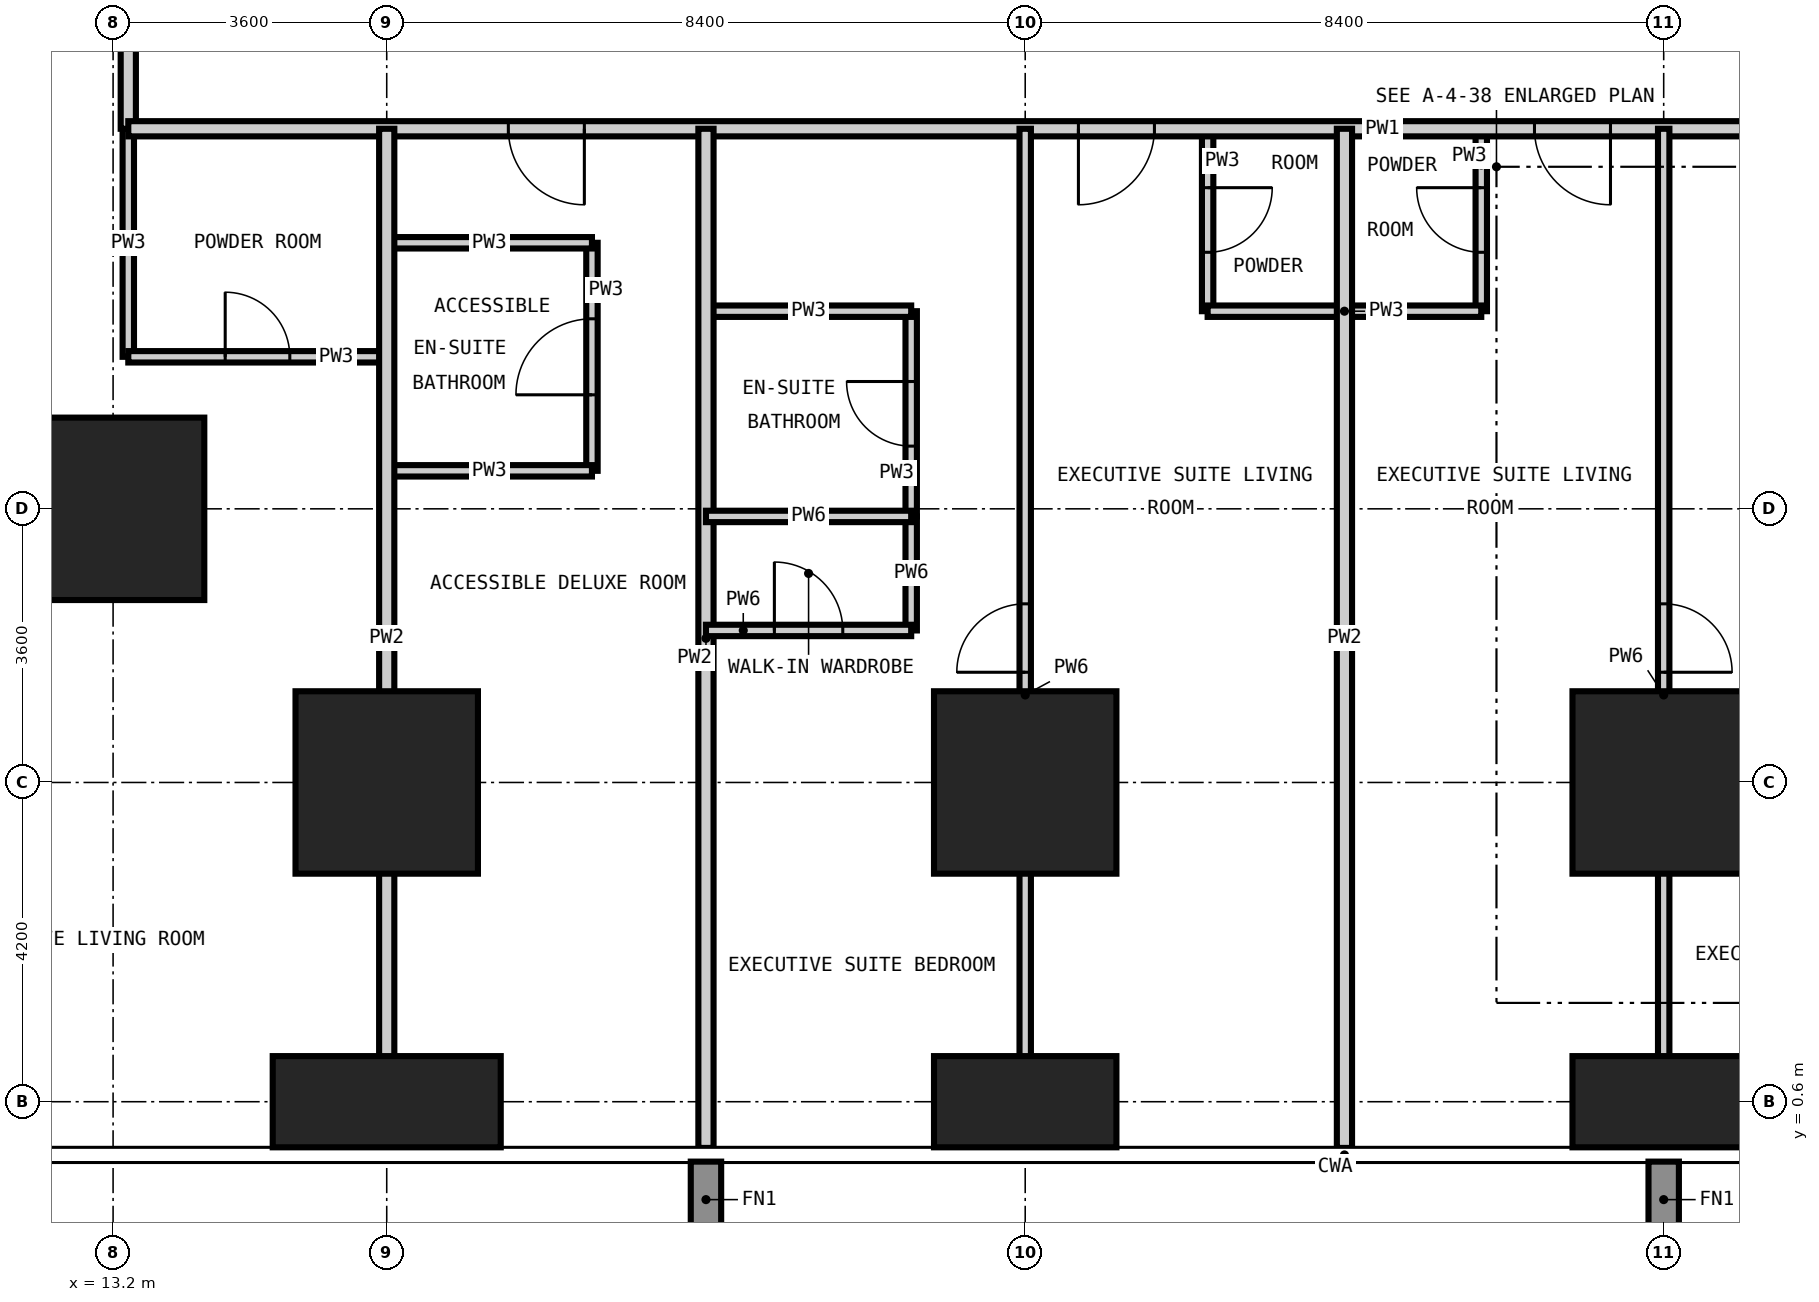
"""IFC4 building model, lengths in metres.
Left out: names, types, materials, properties, quantities, classifications, styles, units other than length and angle.
Written with IfcOpenShell. Run it as: python <this file> out.ifc"""

import sys

from ifc_helpers import new_model, si_unit, direction, frame, frame_2d, origin, origin_2d, place, context, subcontext, project, spatial, rectangle, extrude, element, fill, save


model = new_model("IFC4")
c1 = context("Model", 3, precision=1e-05, world=origin(), true_north=direction((0.0, 1.0)))
c2 = subcontext(c1, "Body", "Model", "MODEL_VIEW")
j1 = project(units=[si_unit("LENGTHUNIT", "METRE"), si_unit("PLANEANGLEUNIT", "RADIAN")], contexts=[c1])
p1 = place(None, origin())
s1 = spatial("IfcSite", under=j1, at=p1, CompositionType="ELEMENT")
p2 = place(p1, origin())
s2 = spatial("IfcBuilding", under=s1, at=p2, CompositionType="ELEMENT")
p3 = place(p2, frame((0.0, 0.0, 84.6)))
s3 = spatial("IfcBuildingStorey", under=s2, at=p3, CompositionType="ELEMENT", Elevation=84.6)
p4 = place(p3, frame((13.2, 8.4, -0.35), z_axis=(0.0, 0.0, 1.0), x_axis=(1.0, 0.0, 0.0)))
e1 = element("IfcColumn", 1, at=p4, inside=s3, PredefinedType="COLUMN", context=c2, shape_type="SweptSolid", body=[
    extrude(rectangle(XDim=2.4, YDim=2.4, at=origin_2d()), origin(), (0.0, 0.0, 1.0), 3.55),
])
p5 = place(p3, frame((16.8, 0.6, -0.35), z_axis=(0.0, 0.0, 1.0), x_axis=(1.0, 0.0, 0.0)))
e2 = element("IfcColumn", 2, at=p5, inside=s3, PredefinedType="COLUMN", context=c2, shape_type="SweptSolid", body=[
    extrude(rectangle(XDim=3.0, YDim=1.2, at=origin_2d()), origin(), (0.0, 0.0, 1.0), 3.55),
])
p6 = place(p3, frame((16.8, 4.8, -0.35), z_axis=(0.0, 0.0, 1.0), x_axis=(1.0, 0.0, 0.0)))
e3 = element("IfcColumn", 3, at=p6, inside=s3, PredefinedType="COLUMN", context=c2, shape_type="SweptSolid", body=[
    extrude(rectangle(XDim=2.4, YDim=2.4, at=origin_2d()), origin(), (0.0, 0.0, 1.0), 3.55),
])
p7 = place(p3, frame((25.2, 0.6, -0.35), z_axis=(0.0, 0.0, 1.0), x_axis=(1.0, 0.0, 0.0)))
e4 = element("IfcColumn", 4, at=p7, inside=s3, PredefinedType="COLUMN", context=c2, shape_type="SweptSolid", body=[
    extrude(rectangle(XDim=2.4, YDim=1.2, at=origin_2d()), origin(), (0.0, 0.0, 1.0), 3.55),
])
p8 = place(p3, frame((25.2, 4.8, -0.35), z_axis=(0.0, 0.0, 1.0), x_axis=(1.0, 0.0, 0.0)))
e5 = element("IfcColumn", 5, at=p8, inside=s3, PredefinedType="COLUMN", context=c2, shape_type="SweptSolid", body=[
    extrude(rectangle(XDim=2.4, YDim=2.4, at=origin_2d()), origin(), (0.0, 0.0, 1.0), 3.55),
])
p9 = place(p3, frame((33.6, 0.6, -0.35), z_axis=(0.0, 0.0, 1.0), x_axis=(1.0, 0.0, 0.0)))
e6 = element("IfcColumn", 6, at=p9, inside=s3, PredefinedType="COLUMN", context=c2, shape_type="SweptSolid", body=[
    extrude(rectangle(XDim=2.4, YDim=1.2, at=origin_2d()), origin(), (0.0, 0.0, 1.0), 3.55),
])
p10 = place(p3, frame((33.6, 4.8, -0.35), z_axis=(0.0, 0.0, 1.0), x_axis=(1.0, 0.0, 0.0)))
e7 = element("IfcColumn", 7, at=p10, inside=s3, PredefinedType="COLUMN", context=c2, shape_type="SweptSolid", body=[
    extrude(rectangle(XDim=2.4, YDim=2.4, at=origin_2d()), origin(), (0.0, 0.0, 1.0), 3.55),
])
p11 = place(p3, frame((13.4, 10.4, 0.0), z_axis=(0.0, 0.0, 1.0), x_axis=(0.0, 1.0, 0.0)))
e8 = element("IfcWall", 8, at=p11, inside=s3, PredefinedType="PARTITIONING", context=c2, shape_type="SweptSolid", body=[
    extrude(rectangle(XDim=3.0, YDim=0.15, at=frame_2d((1.5, 0.0))), origin(), (0.0, 0.0, 1.0), 3.2),
])
p12 = place(p3, frame((19.5, 8.9, 0.0), z_axis=(0.0, 0.0, 1.0), x_axis=(0.0, 1.0, 0.0)))
e9 = element("IfcWall", 9, at=p12, inside=s3, PredefinedType="PARTITIONING", context=c2, shape_type="SweptSolid", body=[
    extrude(rectangle(XDim=3.0, YDim=0.15, at=frame_2d((1.5, 0.0))), origin(), (0.0, 0.0, 1.0), 3.2),
])
p13 = place(p12, frame((1.0, 0.0, 0.0)))
e10 = element("IfcOpeningElement", 10, at=p13, cuts=e9, PredefinedType="OPENING", context=c2, shape_type="SweptSolid", body=[
    extrude(rectangle(XDim=1.0, YDim=2.1, at=frame_2d((0.5, 1.05))), frame((0.0, 0.085, 0.0), z_axis=(0.0, -1.0, 0.0), x_axis=(1.0, 0.0, 0.0)), (0.0, 0.0, 1.0), 0.17),
])
p14 = place(p3, frame((23.7, 8.3, 0.0), z_axis=(0.0, 0.0, 1.0), x_axis=(0.0, 1.0, 0.0)))
e11 = element("IfcWall", 11, at=p14, inside=s3, PredefinedType="PARTITIONING", context=c2, shape_type="SweptSolid", body=[
    extrude(rectangle(XDim=2.7, YDim=0.15, at=frame_2d((1.35, 0.0))), origin(), (0.0, 0.0, 1.0), 3.2),
])
p15 = place(p14, frame((0.925, 0.0, 0.0)))
e12 = element("IfcOpeningElement", 12, at=p15, cuts=e11, PredefinedType="OPENING", context=c2, shape_type="SweptSolid", body=[
    extrude(rectangle(XDim=0.85, YDim=2.1, at=frame_2d((0.425, 1.05))), frame((0.0, 0.085, 0.0), z_axis=(0.0, -1.0, 0.0), x_axis=(1.0, 0.0, 0.0)), (0.0, 0.0, 1.0), 0.17),
])
p16 = place(p3, frame((27.6, 11.0, 0.0), z_axis=(0.0, 0.0, 1.0), x_axis=(0.0, 1.0, 0.0)))
e13 = element("IfcWall", 13, at=p16, inside=s3, PredefinedType="PARTITIONING", context=c2, shape_type="SweptSolid", body=[
    extrude(rectangle(XDim=2.4, YDim=0.15, at=frame_2d((1.2, 0.0))), origin(), (0.0, 0.0, 1.0), 3.2),
])
p17 = place(p16, frame((0.775, 0.0, 0.0)))
e14 = element("IfcOpeningElement", 14, at=p17, cuts=e13, PredefinedType="OPENING", context=c2, shape_type="SweptSolid", body=[
    extrude(rectangle(XDim=0.85, YDim=2.1, at=frame_2d((0.425, 1.05))), frame((0.0, 0.085, 0.0), z_axis=(0.0, -1.0, 0.0), x_axis=(1.0, 0.0, 0.0)), (0.0, 0.0, 1.0), 0.17),
])
p18 = place(p3, frame((31.2, 11.0, 0.0), z_axis=(0.0, 0.0, 1.0), x_axis=(0.0, 1.0, 0.0)))
e15 = element("IfcWall", 15, at=p18, inside=s3, PredefinedType="PARTITIONING", context=c2, shape_type="SweptSolid", body=[
    extrude(rectangle(XDim=2.4, YDim=0.15, at=frame_2d((1.2, 0.0))), origin(), (0.0, 0.0, 1.0), 3.2),
])
p19 = place(p18, frame((0.775, 0.0, 0.0)))
e16 = element("IfcOpeningElement", 16, at=p19, cuts=e15, PredefinedType="OPENING", context=c2, shape_type="SweptSolid", body=[
    extrude(rectangle(XDim=0.85, YDim=2.1, at=frame_2d((0.425, 1.05))), frame((0.0, 0.085, 0.0), z_axis=(0.0, -1.0, 0.0), x_axis=(1.0, 0.0, 0.0)), (0.0, 0.0, 1.0), 0.17),
])
p20 = place(p3, frame((16.8, 8.9, 0.0), z_axis=(0.0, 0.0, 1.0), x_axis=(1.0, 0.0, 0.0)))
e17 = element("IfcWall", 17, at=p20, inside=s3, PredefinedType="PARTITIONING", context=c2, shape_type="SweptSolid", body=[
    extrude(rectangle(XDim=2.7, YDim=0.15, at=frame_2d((1.35, 0.0))), origin(), (0.0, 0.0, 1.0), 3.2),
])
p21 = place(p3, frame((13.4, 10.4, 0.0), z_axis=(0.0, 0.0, 1.0), x_axis=(1.0, 0.0, 0.0)))
e18 = element("IfcWall", 18, at=p21, inside=s3, PredefinedType="PARTITIONING", context=c2, shape_type="SweptSolid", body=[
    extrude(rectangle(XDim=3.4, YDim=0.15, at=frame_2d((1.7, 0.0))), origin(), (0.0, 0.0, 1.0), 3.2),
])
p22 = place(p21, frame((1.275, 0.0, 0.0)))
e19 = element("IfcOpeningElement", 19, at=p22, cuts=e18, PredefinedType="OPENING", context=c2, shape_type="SweptSolid", body=[
    extrude(rectangle(XDim=0.85, YDim=2.1, at=frame_2d((0.425, 1.05))), frame((0.0, 0.085, 0.0), z_axis=(0.0, -1.0, 0.0), x_axis=(1.0, 0.0, 0.0)), (0.0, 0.0, 1.0), 0.17),
])
p23 = place(p3, frame((21.0, 11.0, 0.0), z_axis=(0.0, 0.0, 1.0), x_axis=(1.0, 0.0, 0.0)))
e20 = element("IfcWall", 20, at=p23, inside=s3, PredefinedType="PARTITIONING", context=c2, shape_type="SweptSolid", body=[
    extrude(rectangle(XDim=2.7, YDim=0.15, at=frame_2d((1.35, 0.0))), origin(), (0.0, 0.0, 1.0), 3.2),
])
p24 = place(p3, frame((27.6, 11.0, 0.0), z_axis=(0.0, 0.0, 1.0), x_axis=(1.0, 0.0, 0.0)))
e21 = element("IfcWall", 21, at=p24, inside=s3, PredefinedType="PARTITIONING", context=c2, shape_type="SweptSolid", body=[
    extrude(rectangle(XDim=3.6, YDim=0.15, at=frame_2d((1.8, 0.0))), origin(), (0.0, 0.0, 1.0), 3.2),
])
p25 = place(p3, frame((16.8, 11.9, 0.0), z_axis=(0.0, 0.0, 1.0), x_axis=(1.0, 0.0, 0.0)))
e22 = element("IfcWall", 22, at=p25, inside=s3, PredefinedType="PARTITIONING", context=c2, shape_type="SweptSolid", body=[
    extrude(rectangle(XDim=2.7, YDim=0.15, at=frame_2d((1.35, 0.0))), origin(), (0.0, 0.0, 1.0), 3.2),
])
p26 = place(p3, frame((13.4, 13.4, 0.0), z_axis=(0.0, 0.0, 1.0), x_axis=(0.0, 1.0, 0.0)))
e23 = element("IfcWall", 23, at=p26, inside=s3, PredefinedType="PARTITIONING", context=c2, shape_type="SweptSolid", body=[
    extrude(rectangle(XDim=22.6, YDim=0.2, at=frame_2d((11.3, 0.0))), origin(), (0.0, 0.0, 1.0), 3.2),
])
p27 = place(p26, frame((6.35, 0.0, 0.0)))
e24 = element("IfcOpeningElement", 24, at=p27, cuts=e23, PredefinedType="OPENING", context=c2, shape_type="SweptSolid", body=[
    extrude(rectangle(XDim=1.0, YDim=2.2, at=frame_2d((0.5, 1.1))), frame((0.0, 0.11, 0.0), z_axis=(0.0, -1.0, 0.0), x_axis=(1.0, 0.0, 0.0)), (0.0, 0.0, 1.0), 0.22),
])
p28 = place(p26, frame((13.1, 0.0, 0.0)))
e25 = element("IfcOpeningElement", 25, at=p28, cuts=e23, PredefinedType="OPENING", context=c2, shape_type="SweptSolid", body=[
    extrude(rectangle(XDim=1.0, YDim=2.2, at=frame_2d((0.5, 1.1))), frame((0.0, 0.11, 0.0), z_axis=(0.0, -1.0, 0.0), x_axis=(1.0, 0.0, 0.0)), (0.0, 0.0, 1.0), 0.22),
])
p29 = place(p26, frame((16.25, 0.0, 0.0)))
e26 = element("IfcOpeningElement", 26, at=p29, cuts=e23, PredefinedType="OPENING", context=c2, shape_type="SweptSolid", body=[
    extrude(rectangle(XDim=1.0, YDim=2.2, at=frame_2d((0.5, 1.1))), frame((0.0, 0.11, 0.0), z_axis=(0.0, -1.0, 0.0), x_axis=(1.0, 0.0, 0.0)), (0.0, 0.0, 1.0), 0.22),
])
p30 = place(p26, frame((1.1, 0.0, 0.0)))
e27 = element("IfcOpeningElement", 27, at=p30, cuts=e23, PredefinedType="OPENING", context=c2, shape_type="SweptSolid", body=[
    extrude(rectangle(XDim=1.0, YDim=2.2, at=frame_2d((0.5, 1.1))), frame((0.0, 0.11, 0.0), z_axis=(0.0, -1.0, 0.0), x_axis=(1.0, 0.0, 0.0)), (0.0, 0.0, 1.0), 0.22),
])
p31 = place(p3, frame((46.0, 13.4, 0.0), z_axis=(0.0, 0.0, 1.0), x_axis=(-1.0, 0.0, 0.0)))
e28 = element("IfcWall", 28, at=p31, inside=s3, PredefinedType="PARTITIONING", context=c2, shape_type="SweptSolid", body=[
    extrude(rectangle(XDim=32.6, YDim=0.2, at=frame_2d((16.3, 0.0))), origin(), (0.0, 0.0, 1.0), 3.2),
])
p32 = place(p31, frame((26.6, 0.0, 0.0)))
e29 = element("IfcOpeningElement", 29, at=p32, cuts=e28, PredefinedType="OPENING", context=c2, shape_type="SweptSolid", body=[
    extrude(rectangle(XDim=1.0, YDim=2.2, at=frame_2d((0.5, 1.1))), frame((0.0, 0.11, 0.0), z_axis=(0.0, -1.0, 0.0), x_axis=(1.0, 0.0, 0.0)), (0.0, 0.0, 1.0), 0.22),
])
p33 = place(p31, frame((19.1, 0.0, 0.0)))
e30 = element("IfcOpeningElement", 30, at=p33, cuts=e28, PredefinedType="OPENING", context=c2, shape_type="SweptSolid", body=[
    extrude(rectangle(XDim=1.0, YDim=2.2, at=frame_2d((0.5, 1.1))), frame((0.0, 0.11, 0.0), z_axis=(0.0, -1.0, 0.0), x_axis=(1.0, 0.0, 0.0)), (0.0, 0.0, 1.0), 0.22),
])
p34 = place(p31, frame((13.1, 0.0, 0.0)))
e31 = element("IfcOpeningElement", 31, at=p34, cuts=e28, PredefinedType="OPENING", context=c2, shape_type="SweptSolid", body=[
    extrude(rectangle(XDim=1.0, YDim=2.2, at=frame_2d((0.5, 1.1))), frame((0.0, 0.11, 0.0), z_axis=(0.0, -1.0, 0.0), x_axis=(1.0, 0.0, 0.0)), (0.0, 0.0, 1.0), 0.22),
])
p35 = place(p31, frame((5.6, 0.0, 0.0)))
e32 = element("IfcOpeningElement", 32, at=p35, cuts=e28, PredefinedType="OPENING", context=c2, shape_type="SweptSolid", body=[
    extrude(rectangle(XDim=1.0, YDim=2.2, at=frame_2d((0.5, 1.1))), frame((0.0, 0.11, 0.0), z_axis=(0.0, -1.0, 0.0), x_axis=(1.0, 0.0, 0.0)), (0.0, 0.0, 1.0), 0.22),
])
for number, where, z_axis, x_axis in (
    (33, (16.8, -0.008, 0.0), (0.0, 0.0, 1.0), (0.0, 1.0, 0.0)),
    (34, (21.0, -0.008, 0.0), (0.0, 0.0, 1.0), (0.0, 1.0, 0.0)),
    (35, (29.4, -0.008, 0.0), (0.0, 0.0, 1.0), (0.0, 1.0, 0.0)),
):
    element("IfcWall", number, at=place(p3, frame(where, z_axis=z_axis, x_axis=x_axis)), inside=s3, PredefinedType="PARTITIONING", context=c2, shape_type="SweptSolid", body=[
        extrude(rectangle(XDim=13.408, YDim=0.2, at=frame_2d((6.704, 0.0))), origin(), (0.0, 0.0, 1.0), 3.2),
    ])
p36 = place(p3, frame((23.7, 6.8, 0.0), z_axis=(0.0, 0.0, 1.0), x_axis=(0.0, 1.0, 0.0)))
e36 = element("IfcWall", 36, at=p36, inside=s3, PredefinedType="PARTITIONING", context=c2, shape_type="SweptSolid", body=[
    extrude(rectangle(XDim=1.5, YDim=0.15, at=frame_2d((0.75, 0.0))), origin(), (0.0, 0.0, 1.0), 3.2),
])
p37 = place(p3, frame((25.2, -0.008, 0.0), z_axis=(0.0, 0.0, 1.0), x_axis=(0.0, 1.0, 0.0)))
e37 = element("IfcWall", 37, at=p37, inside=s3, PredefinedType="PARTITIONING", context=c2, shape_type="SweptSolid", body=[
    extrude(rectangle(XDim=13.408, YDim=0.15, at=frame_2d((6.704, 0.0))), origin(), (0.0, 0.0, 1.0), 3.2),
])
p38 = place(p37, frame((6.258, 0.0, 0.0)))
e38 = element("IfcOpeningElement", 38, at=p38, cuts=e37, PredefinedType="OPENING", context=c2, shape_type="SweptSolid", body=[
    extrude(rectangle(XDim=0.9, YDim=2.1, at=frame_2d((0.45, 1.05))), frame((0.0, 0.085, 0.0), z_axis=(0.0, -1.0, 0.0), x_axis=(1.0, 0.0, 0.0)), (0.0, 0.0, 1.0), 0.17),
])
p39 = place(p3, frame((33.6, -0.008, 0.0), z_axis=(0.0, 0.0, 1.0), x_axis=(0.0, 1.0, 0.0)))
e39 = element("IfcWall", 39, at=p39, inside=s3, PredefinedType="PARTITIONING", context=c2, shape_type="SweptSolid", body=[
    extrude(rectangle(XDim=13.408, YDim=0.15, at=frame_2d((6.704, 0.0))), origin(), (0.0, 0.0, 1.0), 3.2),
])
p40 = place(p39, frame((6.258, 0.0, 0.0)))
e40 = element("IfcOpeningElement", 40, at=p40, cuts=e39, PredefinedType="OPENING", context=c2, shape_type="SweptSolid", body=[
    extrude(rectangle(XDim=0.9, YDim=2.1, at=frame_2d((0.45, 1.05))), frame((0.0, 0.085, 0.0), z_axis=(0.0, -1.0, 0.0), x_axis=(1.0, 0.0, 0.0)), (0.0, 0.0, 1.0), 0.17),
])
p41 = place(p3, frame((21.0, 6.8, 0.0), z_axis=(0.0, 0.0, 1.0), x_axis=(1.0, 0.0, 0.0)))
e41 = element("IfcWall", 41, at=p41, inside=s3, PredefinedType="PARTITIONING", context=c2, shape_type="SweptSolid", body=[
    extrude(rectangle(XDim=2.7, YDim=0.15, at=frame_2d((1.35, 0.0))), origin(), (0.0, 0.0, 1.0), 3.2),
])
p42 = place(p41, frame((0.9, 0.0, 0.0)))
e42 = element("IfcOpeningElement", 42, at=p42, cuts=e41, PredefinedType="OPENING", context=c2, shape_type="SweptSolid", body=[
    extrude(rectangle(XDim=0.9, YDim=2.1, at=frame_2d((0.45, 1.05))), frame((0.0, 0.085, 0.0), z_axis=(0.0, -1.0, 0.0), x_axis=(1.0, 0.0, 0.0)), (0.0, 0.0, 1.0), 0.17),
])
p43 = place(p3, frame((21.0, 8.3, 0.0), z_axis=(0.0, 0.0, 1.0), x_axis=(1.0, 0.0, 0.0)))
e43 = element("IfcWall", 43, at=p43, inside=s3, PredefinedType="PARTITIONING", context=c2, shape_type="SweptSolid", body=[
    extrude(rectangle(XDim=2.7, YDim=0.15, at=frame_2d((1.35, 0.0))), origin(), (0.0, 0.0, 1.0), 3.2),
])
p44 = place(p32, origin())
e44 = element("IfcDoor", 44, at=p44, inside=s3, OperationType="SINGLE_SWING_LEFT", PredefinedType="DOOR", context=c2, shape_type="SweptSolid", body=[
    extrude(rectangle(XDim=1.0, YDim=2.2, at=frame_2d((0.5, 1.1))), frame((0.0, 0.025, 0.0), z_axis=(0.0, -1.0, 0.0), x_axis=(1.0, 0.0, 0.0)), (0.0, 0.0, 1.0), 0.05),
])
fill(e29, e44)
p45 = place(p13, origin())
e45 = element("IfcDoor", 45, at=p45, inside=s3, OperationType="SINGLE_SWING_LEFT", PredefinedType="DOOR", context=c2, shape_type="SweptSolid", body=[
    extrude(rectangle(XDim=1.0, YDim=2.1, at=frame_2d((0.5, 1.05))), frame((0.0, 0.025, 0.0), z_axis=(0.0, -1.0, 0.0), x_axis=(1.0, 0.0, 0.0)), (0.0, 0.0, 1.0), 0.05),
])
fill(e10, e45)
p46 = place(p33, origin())
e46 = element("IfcDoor", 46, at=p46, inside=s3, OperationType="SINGLE_SWING_RIGHT", PredefinedType="DOOR", context=c2, shape_type="SweptSolid", body=[
    extrude(rectangle(XDim=1.0, YDim=2.2, at=frame_2d((0.5, 1.1))), frame((0.0, 0.025, 0.0), z_axis=(0.0, -1.0, 0.0), x_axis=(1.0, 0.0, 0.0)), (0.0, 0.0, 1.0), 0.05),
])
fill(e30, e46)
p47 = place(p17, frame((0.85, 0.0, 0.0), z_axis=(0.0, 0.0, 1.0), x_axis=(-1.0, 0.0, 0.0)))
e47 = element("IfcDoor", 47, at=p47, inside=s3, OperationType="SINGLE_SWING_LEFT", PredefinedType="DOOR", context=c2, shape_type="SweptSolid", body=[
    extrude(rectangle(XDim=0.85, YDim=2.1, at=frame_2d((0.425, 1.05))), frame((0.0, 0.025, 0.0), z_axis=(0.0, -1.0, 0.0), x_axis=(1.0, 0.0, 0.0)), (0.0, 0.0, 1.0), 0.05),
])
fill(e14, e47)
p48 = place(p38, origin())
e48 = element("IfcDoor", 48, at=p48, inside=s3, OperationType="SINGLE_SWING_LEFT", PredefinedType="DOOR", context=c2, shape_type="SweptSolid", body=[
    extrude(rectangle(XDim=0.9, YDim=2.1, at=frame_2d((0.45, 1.05))), frame((0.0, 0.025, 0.0), z_axis=(0.0, -1.0, 0.0), x_axis=(1.0, 0.0, 0.0)), (0.0, 0.0, 1.0), 0.05),
])
fill(e38, e48)
p49 = place(p15, origin())
e49 = element("IfcDoor", 49, at=p49, inside=s3, OperationType="SINGLE_SWING_RIGHT", PredefinedType="DOOR", context=c2, shape_type="SweptSolid", body=[
    extrude(rectangle(XDim=0.85, YDim=2.1, at=frame_2d((0.425, 1.05))), frame((0.0, 0.025, 0.0), z_axis=(0.0, -1.0, 0.0), x_axis=(1.0, 0.0, 0.0)), (0.0, 0.0, 1.0), 0.05),
])
fill(e12, e49)
p50 = place(p42, origin())
e50 = element("IfcDoor", 50, at=p50, inside=s3, OperationType="SINGLE_SWING_LEFT", PredefinedType="DOOR", context=c2, shape_type="SweptSolid", body=[
    extrude(rectangle(XDim=0.9, YDim=2.1, at=frame_2d((0.45, 1.05))), frame((0.0, 0.025, 0.0), z_axis=(0.0, -1.0, 0.0), x_axis=(1.0, 0.0, 0.0)), (0.0, 0.0, 1.0), 0.05),
])
fill(e42, e50)
p51 = place(p34, origin())
e51 = element("IfcDoor", 51, at=p51, inside=s3, OperationType="SINGLE_SWING_LEFT", PredefinedType="DOOR", context=c2, shape_type="SweptSolid", body=[
    extrude(rectangle(XDim=1.0, YDim=2.2, at=frame_2d((0.5, 1.1))), frame((0.0, 0.025, 0.0), z_axis=(0.0, -1.0, 0.0), x_axis=(1.0, 0.0, 0.0)), (0.0, 0.0, 1.0), 0.05),
])
fill(e31, e51)
p52 = place(p19, origin())
e52 = element("IfcDoor", 52, at=p52, inside=s3, OperationType="SINGLE_SWING_RIGHT", PredefinedType="DOOR", context=c2, shape_type="SweptSolid", body=[
    extrude(rectangle(XDim=0.85, YDim=2.1, at=frame_2d((0.425, 1.05))), frame((0.0, 0.025, 0.0), z_axis=(0.0, -1.0, 0.0), x_axis=(1.0, 0.0, 0.0)), (0.0, 0.0, 1.0), 0.05),
])
fill(e16, e52)
p53 = place(p40, frame((0.9, 0.0, 0.0), z_axis=(0.0, 0.0, 1.0), x_axis=(-1.0, 0.0, 0.0)))
e53 = element("IfcDoor", 53, at=p53, inside=s3, OperationType="SINGLE_SWING_RIGHT", PredefinedType="DOOR", context=c2, shape_type="SweptSolid", body=[
    extrude(rectangle(XDim=0.9, YDim=2.1, at=frame_2d((0.45, 1.05))), frame((0.0, 0.025, 0.0), z_axis=(0.0, -1.0, 0.0), x_axis=(1.0, 0.0, 0.0)), (0.0, 0.0, 1.0), 0.05),
])
fill(e40, e53)
p54 = place(p22, origin())
e54 = element("IfcDoor", 54, at=p54, inside=s3, OperationType="SINGLE_SWING_LEFT", PredefinedType="DOOR", context=c2, shape_type="SweptSolid", body=[
    extrude(rectangle(XDim=0.85, YDim=2.1, at=frame_2d((0.425, 1.05))), frame((0.0, 0.025, 0.0), z_axis=(0.0, -1.0, 0.0), x_axis=(1.0, 0.0, 0.0)), (0.0, 0.0, 1.0), 0.05),
])
fill(e19, e54)
save(model, sys.argv[1])
